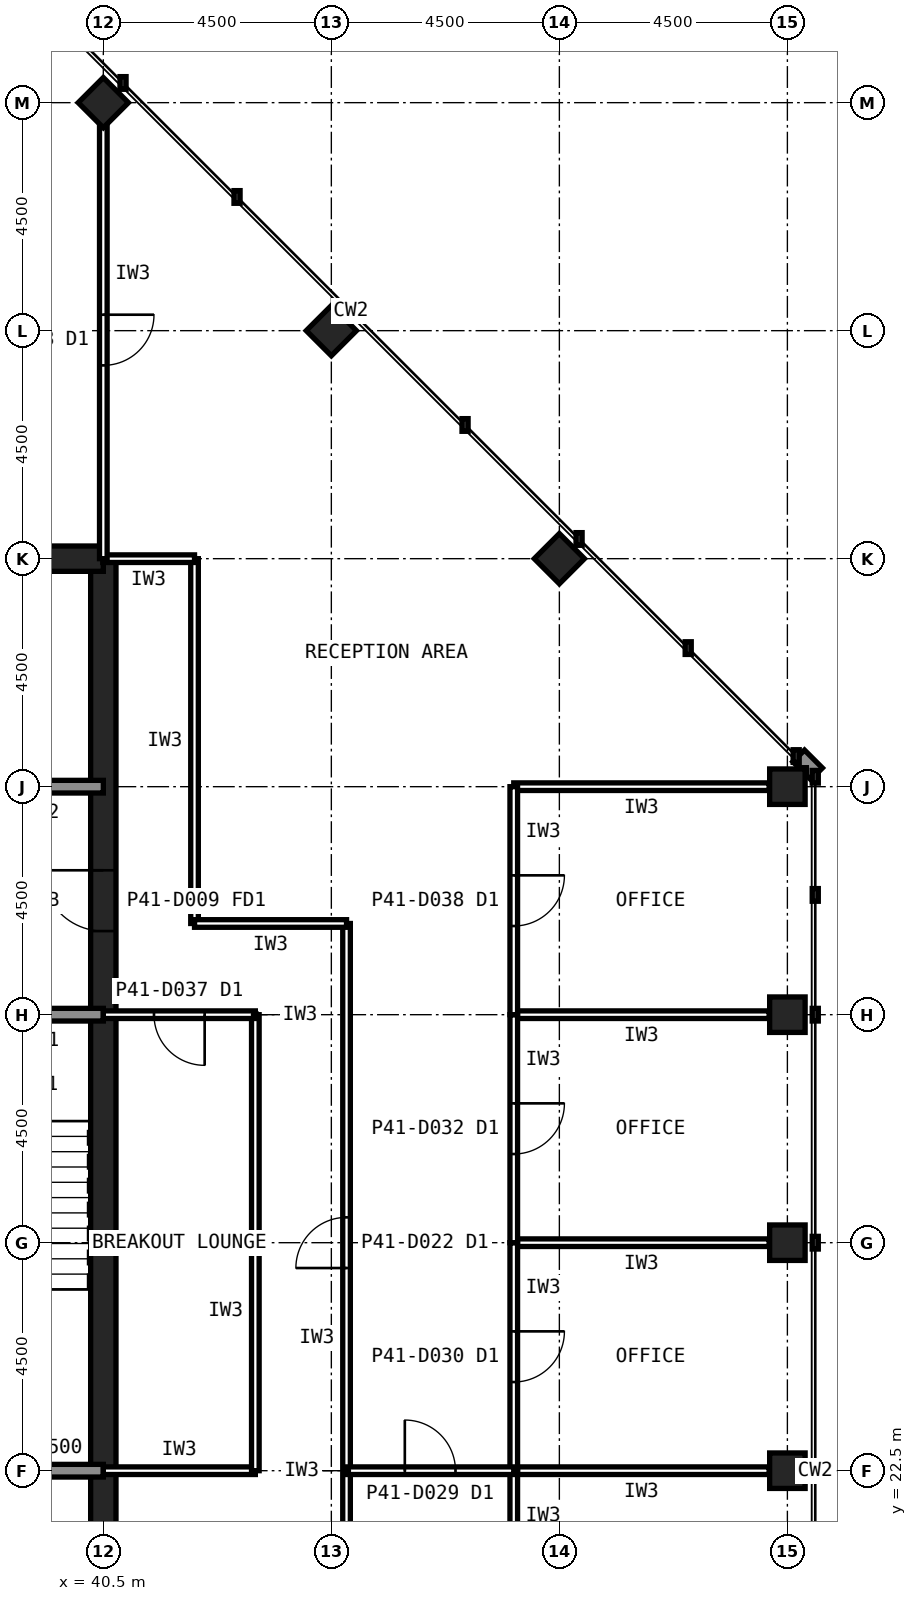
"""IFC4 building model, lengths in metres.
Left out: names, types, materials, properties, quantities, classifications, styles, units other than length and angle.
Written with IfcOpenShell. Run it as: python <this file> out.ifc"""

import sys

from ifc_helpers import new_model, si_unit, direction, frame, frame_2d, origin, origin_2d, place, context, subcontext, project, spatial, rectangle, hollow_rectangle, extrude, element, fill, save


model = new_model("IFC4")
c1 = context("Model", 3, precision=1e-05, world=origin(), true_north=direction((0.0, 1.0)))
c2 = subcontext(c1, "Body", "Model", "MODEL_VIEW")
j1 = project(units=[si_unit("LENGTHUNIT", "METRE"), si_unit("PLANEANGLEUNIT", "RADIAN")], contexts=[c1])
p1 = place(None, origin())
s1 = spatial("IfcSite", under=j1, at=p1, CompositionType="ELEMENT")
p2 = place(p1, origin())
s2 = spatial("IfcBuilding", under=s1, at=p2, CompositionType="ELEMENT")
p3 = place(p2, frame((0.0, 0.0, 175.6)))
s3 = spatial("IfcBuildingStorey", under=s2, at=p3, CompositionType="ELEMENT", Elevation=175.6)
for number, where, z_axis, x_axis in (
    (1, (54.0, 22.5, 0.0), (0.0, 0.0, 1.0), (1.0, 0.0, 0.0)),
    (2, (54.0, 27.0, 0.0), (0.0, 0.0, 1.0), (1.0, 0.0, 0.0)),
    (3, (54.0, 31.5, 0.0), (0.0, 0.0, 1.0), (1.0, 0.0, 0.0)),
    (4, (54.0, 36.0, 0.0), (0.0, 0.0, 1.0), (1.0, 0.0, 0.0)),
    (5, (49.5, 40.5, 0.0), (0.0, 0.0, 1.0), (0.707, 0.707, 0.0)),
    (6, (45.0, 45.0, 0.0), (0.0, 0.0, 1.0), (0.707, 0.707, 0.0)),
    (7, (40.5, 49.5, 0.0), (0.0, 0.0, 1.0), (0.707, 0.707, 0.0)),
):
    element("IfcColumn", number, at=place(p3, frame(where, z_axis=z_axis, x_axis=x_axis)), inside=s3, PredefinedType="COLUMN", context=c2, shape_type="SweptSolid", body=[
        extrude(hollow_rectangle(XDim=0.7, YDim=0.7, WallThickness=0.036, at=origin_2d()), origin(), (0.0, 0.0, 1.0), 4.0),
    ])
p4 = place(p3, frame((40.5, 13.5, 0.0), z_axis=(0.0, 0.0, 1.0), x_axis=(0.0, 1.0, 0.0)))
e8 = element("IfcWall", 8, at=p4, inside=s3, PredefinedType="SHEAR", context=c2, shape_type="SweptSolid", body=[
    extrude(rectangle(XDim=27.0, YDim=0.5, at=frame_2d((13.5, 0.0))), origin(), (0.0, 0.0, 1.0), 4.0),
])
p5 = place(p4, frame((5.85, 0.0, 0.0)))
e9 = element("IfcOpeningElement", 9, at=p5, cuts=e8, PredefinedType="OPENING", context=c2, shape_type="SweptSolid", body=[
    extrude(rectangle(XDim=1.8, YDim=2.1, at=frame_2d((0.9, 1.05))), frame((0.0, 0.26, 0.0), z_axis=(0.0, -1.0, 0.0), x_axis=(1.0, 0.0, 0.0)), (0.0, 0.0, 1.0), 0.52),
])
p6 = place(p4, frame((19.65, 0.0, 0.0)))
e10 = element("IfcOpeningElement", 10, at=p6, cuts=e8, PredefinedType="OPENING", context=c2, shape_type="SweptSolid", body=[
    extrude(rectangle(XDim=1.2, YDim=2.1, at=frame_2d((0.6, 1.05))), frame((0.0, 0.26, 0.0), z_axis=(0.0, -1.0, 0.0), x_axis=(1.0, 0.0, 0.0)), (0.0, 0.0, 1.0), 0.52),
])
p7 = place(p3, frame((40.5, 40.5, 0.0), z_axis=(0.0, 0.0, 1.0), x_axis=(-1.0, 0.0, 0.0)))
e11 = element("IfcWall", 11, at=p7, inside=s3, PredefinedType="SHEAR", context=c2, shape_type="SweptSolid", body=[
    extrude(rectangle(XDim=27.0, YDim=0.5, at=frame_2d((13.5, 0.0))), origin(), (0.0, 0.0, 1.0), 4.0),
])
p8 = place(p3, frame((13.5, 36.0, 0.0), z_axis=(0.0, 0.0, 1.0), x_axis=(1.0, 0.0, 0.0)))
e12 = element("IfcWall", 12, at=p8, inside=s3, PredefinedType="SOLIDWALL", context=c2, shape_type="SweptSolid", body=[
    extrude(rectangle(XDim=27.0, YDim=0.25, at=frame_2d((13.5, 0.0))), origin(), (0.0, 0.0, 1.0), 3.84),
])
p9 = place(p8, frame((1.8, 0.0, 0.0)))
e13 = element("IfcOpeningElement", 13, at=p9, cuts=e12, PredefinedType="OPENING", context=c2, shape_type="SweptSolid", body=[
    extrude(rectangle(XDim=0.9, YDim=2.1, at=frame_2d((0.45, 1.05))), frame((0.0, 0.135, 0.0), z_axis=(0.0, -1.0, 0.0), x_axis=(1.0, 0.0, 0.0)), (0.0, 0.0, 1.0), 0.27),
])
p10 = place(p8, frame((5.55, 0.0, 0.0)))
e14 = element("IfcOpeningElement", 14, at=p10, cuts=e12, PredefinedType="OPENING", context=c2, shape_type="SweptSolid", body=[
    extrude(rectangle(XDim=0.9, YDim=2.1, at=frame_2d((0.45, 1.05))), frame((0.0, 0.135, 0.0), z_axis=(0.0, -1.0, 0.0), x_axis=(1.0, 0.0, 0.0)), (0.0, 0.0, 1.0), 0.27),
])
p11 = place(p8, frame((8.55, 0.0, 0.0)))
e15 = element("IfcOpeningElement", 15, at=p11, cuts=e12, PredefinedType="OPENING", context=c2, shape_type="SweptSolid", body=[
    extrude(rectangle(XDim=0.9, YDim=2.1, at=frame_2d((0.45, 1.05))), frame((0.0, 0.135, 0.0), z_axis=(0.0, -1.0, 0.0), x_axis=(1.0, 0.0, 0.0)), (0.0, 0.0, 1.0), 0.27),
])
p12 = place(p8, frame((11.55, 0.0, 0.0)))
e16 = element("IfcOpeningElement", 16, at=p12, cuts=e12, PredefinedType="OPENING", context=c2, shape_type="SweptSolid", body=[
    extrude(rectangle(XDim=0.9, YDim=2.1, at=frame_2d((0.45, 1.05))), frame((0.0, 0.135, 0.0), z_axis=(0.0, -1.0, 0.0), x_axis=(1.0, 0.0, 0.0)), (0.0, 0.0, 1.0), 0.27),
])
p13 = place(p8, frame((24.1, 0.0, 0.0)))
e17 = element("IfcOpeningElement", 17, at=p13, cuts=e12, PredefinedType="OPENING", context=c2, shape_type="SweptSolid", body=[
    extrude(rectangle(XDim=1.3, YDim=2.2, at=frame_2d((0.65, 1.1))), frame((0.0, 0.135, 0.0), z_axis=(0.0, -1.0, 0.0), x_axis=(1.0, 0.0, 0.0)), (0.0, 0.0, 1.0), 0.27),
])
p14 = place(p3, frame((13.5, 22.5, 0.0), z_axis=(0.0, 0.0, 1.0), x_axis=(1.0, 0.0, 0.0)))
e18 = element("IfcWall", 18, at=p14, inside=s3, PredefinedType="SOLIDWALL", context=c2, shape_type="SweptSolid", body=[
    extrude(rectangle(XDim=27.0, YDim=0.25, at=frame_2d((13.5, 0.0))), origin(), (0.0, 0.0, 1.0), 3.84),
])
p15 = place(p14, frame((1.65, 0.0, 0.0)))
e19 = element("IfcOpeningElement", 19, at=p15, cuts=e18, PredefinedType="OPENING", context=c2, shape_type="SweptSolid", body=[
    extrude(rectangle(XDim=1.2, YDim=2.1, at=frame_2d((0.6, 1.05))), frame((0.0, 0.135, 0.0), z_axis=(0.0, -1.0, 0.0), x_axis=(1.0, 0.0, 0.0)), (0.0, 0.0, 1.0), 0.27),
])
p16 = place(p14, frame((6.025, 0.0, 0.0)))
e20 = element("IfcOpeningElement", 20, at=p16, cuts=e18, PredefinedType="OPENING", context=c2, shape_type="SweptSolid", body=[
    extrude(rectangle(XDim=1.0, YDim=2.1, at=frame_2d((0.5, 1.05))), frame((0.0, 0.135, 0.0), z_axis=(0.0, -1.0, 0.0), x_axis=(1.0, 0.0, 0.0)), (0.0, 0.0, 1.0), 0.27),
])
p17 = place(p14, frame((10.525, 0.0, 0.0)))
e21 = element("IfcOpeningElement", 21, at=p17, cuts=e18, PredefinedType="OPENING", context=c2, shape_type="SweptSolid", body=[
    extrude(rectangle(XDim=1.0, YDim=2.1, at=frame_2d((0.5, 1.05))), frame((0.0, 0.135, 0.0), z_axis=(0.0, -1.0, 0.0), x_axis=(1.0, 0.0, 0.0)), (0.0, 0.0, 1.0), 0.27),
])
p18 = place(p14, frame((19.75, 0.0, 0.0)))
e22 = element("IfcOpeningElement", 22, at=p18, cuts=e18, PredefinedType="OPENING", context=c2, shape_type="SweptSolid", body=[
    extrude(rectangle(XDim=1.0, YDim=2.1, at=frame_2d((0.5, 1.05))), frame((0.0, 0.135, 0.0), z_axis=(0.0, -1.0, 0.0), x_axis=(1.0, 0.0, 0.0)), (0.0, 0.0, 1.0), 0.27),
])
p19 = place(p14, frame((15.05, 0.0, 0.0)))
e23 = element("IfcOpeningElement", 23, at=p19, cuts=e18, PredefinedType="OPENING", context=c2, shape_type="SweptSolid", body=[
    extrude(rectangle(XDim=1.4, YDim=2.4, at=frame_2d((0.7, 1.2))), frame((0.0, 0.135, 0.0), z_axis=(0.0, -1.0, 0.0), x_axis=(1.0, 0.0, 0.0)), (0.0, 0.0, 1.0), 0.27),
])
p20 = place(p3, frame((13.5, 31.5, 0.0), z_axis=(0.0, 0.0, 1.0), x_axis=(1.0, 0.0, 0.0)))
e24 = element("IfcWall", 24, at=p20, inside=s3, PredefinedType="SOLIDWALL", context=c2, shape_type="SweptSolid", body=[
    extrude(rectangle(XDim=27.0, YDim=0.25, at=frame_2d((13.5, 0.0))), origin(), (0.0, 0.0, 1.0), 3.84),
])
p21 = place(p20, frame((24.15, 0.0, 0.0)))
e25 = element("IfcOpeningElement", 25, at=p21, cuts=e24, PredefinedType="OPENING", context=c2, shape_type="SweptSolid", body=[
    extrude(rectangle(XDim=1.2, YDim=2.1, at=frame_2d((0.6, 1.05))), frame((0.0, 0.135, 0.0), z_axis=(0.0, -1.0, 0.0), x_axis=(1.0, 0.0, 0.0)), (0.0, 0.0, 1.0), 0.27),
])
p22 = place(p20, frame((15.3, 0.0, 0.0)))
e26 = element("IfcOpeningElement", 26, at=p22, cuts=e24, PredefinedType="OPENING", context=c2, shape_type="SweptSolid", body=[
    extrude(rectangle(XDim=0.9, YDim=2.1, at=frame_2d((0.45, 1.05))), frame((0.0, 0.135, 0.0), z_axis=(0.0, -1.0, 0.0), x_axis=(1.0, 0.0, 0.0)), (0.0, 0.0, 1.0), 0.27),
])
p23 = place(p20, frame((19.8, 0.0, 0.0)))
e27 = element("IfcOpeningElement", 27, at=p23, cuts=e24, PredefinedType="OPENING", context=c2, shape_type="SweptSolid", body=[
    extrude(rectangle(XDim=0.9, YDim=2.1, at=frame_2d((0.45, 1.05))), frame((0.0, 0.135, 0.0), z_axis=(0.0, -1.0, 0.0), x_axis=(1.0, 0.0, 0.0)), (0.0, 0.0, 1.0), 0.27),
])
p24 = place(p3, frame((45.3, 20.7, 0.0), z_axis=(0.0, 0.0, 1.0), x_axis=(0.0, 1.0, 0.0)))
e28 = element("IfcWall", 28, at=p24, inside=s3, PredefinedType="PARTITIONING", context=c2, shape_type="SweptSolid", body=[
    extrude(rectangle(XDim=12.6, YDim=0.15, at=frame_2d((6.3, 0.0))), origin(), (0.0, 0.0, 1.0), 3.84),
])
p25 = place(p24, frame((5.8, 0.0, 0.0)))
e29 = element("IfcOpeningElement", 29, at=p25, cuts=e28, PredefinedType="OPENING", context=c2, shape_type="SweptSolid", body=[
    extrude(rectangle(XDim=1.0, YDim=2.1, at=frame_2d((0.5, 1.05))), frame((0.0, 0.085, 0.0), z_axis=(0.0, -1.0, 0.0), x_axis=(1.0, 0.0, 0.0)), (0.0, 0.0, 1.0), 0.17),
])
p26 = place(p3, frame((42.3, 33.3, 0.0), z_axis=(0.0, 0.0, 1.0), x_axis=(0.0, 1.0, 0.0)))
e30 = element("IfcWall", 30, at=p26, inside=s3, PredefinedType="PARTITIONING", context=c2, shape_type="SweptSolid", body=[
    extrude(rectangle(XDim=7.2, YDim=0.15, at=frame_2d((3.6, 0.0))), origin(), (0.0, 0.0, 1.0), 3.84),
])
p27 = place(p3, frame((45.3, 33.3, 0.0), z_axis=(0.0, 0.0, 1.0), x_axis=(-1.0, 0.0, 0.0)))
e31 = element("IfcWall", 31, at=p27, inside=s3, PredefinedType="PARTITIONING", context=c2, shape_type="SweptSolid", body=[
    extrude(rectangle(XDim=3.0, YDim=0.15, at=frame_2d((1.5, 0.0))), origin(), (0.0, 0.0, 1.0), 3.84),
])
p28 = place(p3, frame((42.3, 40.5, 0.0), z_axis=(0.0, 0.0, 1.0), x_axis=(-1.0, 0.0, 0.0)))
e32 = element("IfcWall", 32, at=p28, inside=s3, PredefinedType="PARTITIONING", context=c2, shape_type="SweptSolid", body=[
    extrude(rectangle(XDim=1.81, YDim=0.15, at=frame_2d((0.905, 0.0))), origin(), (0.0, 0.0, 1.0), 2.989),
])
p29 = place(p3, frame((53.64, 22.5, 0.0), z_axis=(0.0, 0.0, 1.0), x_axis=(-1.0, 0.0, 0.0)))
e33 = element("IfcWall", 33, at=p29, inside=s3, PredefinedType="PARTITIONING", context=c2, shape_type="SweptSolid", body=[
    extrude(rectangle(XDim=5.04, YDim=0.15, at=frame_2d((2.52, 0.0))), origin(), (0.0, 0.0, 1.0), 2.989),
])
p30 = place(p3, frame((48.6, 22.5, 0.0), z_axis=(0.0, 0.0, 1.0), x_axis=(0.0, -1.0, 0.0)))
e34 = element("IfcWall", 34, at=p30, inside=s3, PredefinedType="PARTITIONING", context=c2, shape_type="SweptSolid", body=[
    extrude(rectangle(XDim=4.5, YDim=0.15, at=frame_2d((2.25, 0.0))), origin(), (0.0, 0.0, 1.0), 3.84),
])
p31 = place(p30, frame((1.75, 0.0, 0.0)))
e35 = element("IfcOpeningElement", 35, at=p31, cuts=e34, PredefinedType="OPENING", context=c2, shape_type="SweptSolid", body=[
    extrude(rectangle(XDim=1.0, YDim=2.1, at=frame_2d((0.5, 1.05))), frame((0.0, 0.085, 0.0), z_axis=(0.0, -1.0, 0.0), x_axis=(1.0, 0.0, 0.0)), (0.0, 0.0, 1.0), 0.17),
])
p32 = place(p3, frame((53.64, 27.0, 0.0), z_axis=(0.0, 0.0, 1.0), x_axis=(-1.0, 0.0, 0.0)))
e36 = element("IfcWall", 36, at=p32, inside=s3, PredefinedType="PARTITIONING", context=c2, shape_type="SweptSolid", body=[
    extrude(rectangle(XDim=5.04, YDim=0.15, at=frame_2d((2.52, 0.0))), origin(), (0.0, 0.0, 1.0), 2.989),
])
p33 = place(p3, frame((48.6, 27.0, 0.0), z_axis=(0.0, 0.0, 1.0), x_axis=(0.0, -1.0, 0.0)))
e37 = element("IfcWall", 37, at=p33, inside=s3, PredefinedType="PARTITIONING", context=c2, shape_type="SweptSolid", body=[
    extrude(rectangle(XDim=4.5, YDim=0.15, at=frame_2d((2.25, 0.0))), origin(), (0.0, 0.0, 1.0), 3.84),
])
p34 = place(p33, frame((1.75, 0.0, 0.0)))
e38 = element("IfcOpeningElement", 38, at=p34, cuts=e37, PredefinedType="OPENING", context=c2, shape_type="SweptSolid", body=[
    extrude(rectangle(XDim=1.0, YDim=2.1, at=frame_2d((0.5, 1.05))), frame((0.0, 0.085, 0.0), z_axis=(0.0, -1.0, 0.0), x_axis=(1.0, 0.0, 0.0)), (0.0, 0.0, 1.0), 0.17),
])
p35 = place(p3, frame((53.64, 31.5, 0.0), z_axis=(0.0, 0.0, 1.0), x_axis=(-1.0, 0.0, 0.0)))
e39 = element("IfcWall", 39, at=p35, inside=s3, PredefinedType="PARTITIONING", context=c2, shape_type="SweptSolid", body=[
    extrude(rectangle(XDim=5.04, YDim=0.15, at=frame_2d((2.52, 0.0))), origin(), (0.0, 0.0, 1.0), 2.989),
])
p36 = place(p3, frame((48.6, 31.5, 0.0), z_axis=(0.0, 0.0, 1.0), x_axis=(0.0, -1.0, 0.0)))
e40 = element("IfcWall", 40, at=p36, inside=s3, PredefinedType="PARTITIONING", context=c2, shape_type="SweptSolid", body=[
    extrude(rectangle(XDim=4.5, YDim=0.15, at=frame_2d((2.25, 0.0))), origin(), (0.0, 0.0, 1.0), 3.84),
])
p37 = place(p36, frame((1.75, 0.0, 0.0)))
e41 = element("IfcOpeningElement", 41, at=p37, cuts=e40, PredefinedType="OPENING", context=c2, shape_type="SweptSolid", body=[
    extrude(rectangle(XDim=1.0, YDim=2.1, at=frame_2d((0.5, 1.05))), frame((0.0, 0.085, 0.0), z_axis=(0.0, -1.0, 0.0), x_axis=(1.0, 0.0, 0.0)), (0.0, 0.0, 1.0), 0.17),
])
p38 = place(p3, frame((53.64, 36.0, 0.0), z_axis=(0.0, 0.0, 1.0), x_axis=(-1.0, 0.0, 0.0)))
e42 = element("IfcWall", 42, at=p38, inside=s3, PredefinedType="PARTITIONING", context=c2, shape_type="SweptSolid", body=[
    extrude(rectangle(XDim=5.04, YDim=0.15, at=frame_2d((2.52, 0.0))), origin(), (0.0, 0.0, 1.0), 2.989),
])
p39 = place(p3, frame((48.6, 36.0, 0.0), z_axis=(0.0, 0.0, 1.0), x_axis=(0.0, -1.0, 0.0)))
e43 = element("IfcWall", 43, at=p39, inside=s3, PredefinedType="PARTITIONING", context=c2, shape_type="SweptSolid", body=[
    extrude(rectangle(XDim=4.5, YDim=0.15, at=frame_2d((2.25, 0.0))), origin(), (0.0, 0.0, 1.0), 3.84),
])
p40 = place(p39, frame((1.75, 0.0, 0.0)))
e44 = element("IfcOpeningElement", 44, at=p40, cuts=e43, PredefinedType="OPENING", context=c2, shape_type="SweptSolid", body=[
    extrude(rectangle(XDim=1.0, YDim=2.1, at=frame_2d((0.5, 1.05))), frame((0.0, 0.085, 0.0), z_axis=(0.0, -1.0, 0.0), x_axis=(1.0, 0.0, 0.0)), (0.0, 0.0, 1.0), 0.17),
])
p41 = place(p3, frame((40.5, 22.5, 0.0), z_axis=(0.0, 0.0, 1.0), x_axis=(1.0, 0.0, 0.0)))
e45 = element("IfcWall", 45, at=p41, inside=s3, PredefinedType="PARTITIONING", context=c2, shape_type="SweptSolid", body=[
    extrude(rectangle(XDim=3.0, YDim=0.15, at=frame_2d((1.5, 0.0))), origin(), (0.0, 0.0, 1.0), 2.989),
])
p42 = place(p3, frame((43.5, 22.5, 0.0), z_axis=(0.0, 0.0, 1.0), x_axis=(0.0, 1.0, 0.0)))
e46 = element("IfcWall", 46, at=p42, inside=s3, PredefinedType="PARTITIONING", context=c2, shape_type="SweptSolid", body=[
    extrude(rectangle(XDim=9.0, YDim=0.15, at=frame_2d((4.5, 0.0))), origin(), (0.0, 0.0, 1.0), 3.84),
])
p43 = place(p3, frame((43.5, 31.5, 0.0), z_axis=(0.0, 0.0, 1.0), x_axis=(-1.0, 0.0, 0.0)))
e47 = element("IfcWall", 47, at=p43, inside=s3, PredefinedType="PARTITIONING", context=c2, shape_type="SweptSolid", body=[
    extrude(rectangle(XDim=3.0, YDim=0.15, at=frame_2d((1.5, 0.0))), origin(), (0.0, 0.0, 1.0), 2.989),
])
p44 = place(p43, frame((1.0, 0.0, 0.0)))
e48 = element("IfcOpeningElement", 48, at=p44, cuts=e47, PredefinedType="OPENING", context=c2, shape_type="SweptSolid", body=[
    extrude(rectangle(XDim=1.0, YDim=2.1, at=frame_2d((0.5, 1.05))), frame((0.0, 0.085, 0.0), z_axis=(0.0, -1.0, 0.0), x_axis=(1.0, 0.0, 0.0)), (0.0, 0.0, 1.0), 0.17),
])
p45 = place(p3, frame((40.5, 49.13, 0.0), z_axis=(0.0, 0.0, 1.0), x_axis=(0.0, -1.0, 0.0)))
e49 = element("IfcWall", 49, at=p45, inside=s3, PredefinedType="PARTITIONING", context=c2, shape_type="SweptSolid", body=[
    extrude(rectangle(XDim=8.63, YDim=0.15, at=frame_2d((4.315, 0.0))), origin(), (0.0, 0.0, 1.0), 2.989),
])
p46 = place(p45, frame((3.815, 0.0, 0.0)))
e50 = element("IfcOpeningElement", 50, at=p46, cuts=e49, PredefinedType="OPENING", context=c2, shape_type="SweptSolid", body=[
    extrude(rectangle(XDim=1.0, YDim=2.1, at=frame_2d((0.5, 1.05))), frame((0.0, 0.085, 0.0), z_axis=(0.0, -1.0, 0.0), x_axis=(1.0, 0.0, 0.0)), (0.0, 0.0, 1.0), 0.17),
])
p47 = place(p3, frame((45.3, 22.5, 0.0), z_axis=(0.0, 0.0, 1.0), x_axis=(1.0, 0.0, 0.0)))
e51 = element("IfcWall", 51, at=p47, inside=s3, PredefinedType="PARTITIONING", context=c2, shape_type="SweptSolid", body=[
    extrude(rectangle(XDim=3.3, YDim=0.15, at=frame_2d((1.65, 0.0))), origin(), (0.0, 0.0, 1.0), 2.989),
])
p48 = place(p47, frame((1.15, 0.0, 0.0)))
e52 = element("IfcOpeningElement", 52, at=p48, cuts=e51, PredefinedType="OPENING", context=c2, shape_type="SweptSolid", body=[
    extrude(rectangle(XDim=1.0, YDim=2.1, at=frame_2d((0.5, 1.05))), frame((0.0, 0.085, 0.0), z_axis=(0.0, -1.0, 0.0), x_axis=(1.0, 0.0, 0.0)), (0.0, 0.0, 1.0), 0.17),
])
p49 = place(p6, origin())
e53 = element("IfcDoor", 53, at=p49, inside=s3, OperationType="SINGLE_SWING_RIGHT", PredefinedType="DOOR", context=c2, shape_type="SweptSolid", body=[
    extrude(rectangle(XDim=1.2, YDim=2.1, at=frame_2d((0.6, 1.05))), frame((0.0, 0.025, 0.0), z_axis=(0.0, -1.0, 0.0), x_axis=(1.0, 0.0, 0.0)), (0.0, 0.0, 1.0), 0.05),
])
fill(e10, e53)
p50 = place(p25, origin())
e54 = element("IfcDoor", 54, at=p50, inside=s3, OperationType="SINGLE_SWING_LEFT", PredefinedType="DOOR", context=c2, shape_type="SweptSolid", body=[
    extrude(rectangle(XDim=1.0, YDim=2.1, at=frame_2d((0.5, 1.05))), frame((0.0, 0.025, 0.0), z_axis=(0.0, -1.0, 0.0), x_axis=(1.0, 0.0, 0.0)), (0.0, 0.0, 1.0), 0.05),
])
fill(e29, e54)
p51 = place(p34, origin())
e55 = element("IfcDoor", 55, at=p51, inside=s3, OperationType="SINGLE_SWING_LEFT", PredefinedType="DOOR", context=c2, shape_type="SweptSolid", body=[
    extrude(rectangle(XDim=1.0, YDim=2.1, at=frame_2d((0.5, 1.05))), frame((0.0, 0.025, 0.0), z_axis=(0.0, -1.0, 0.0), x_axis=(1.0, 0.0, 0.0)), (0.0, 0.0, 1.0), 0.05),
])
fill(e38, e55)
p52 = place(p37, origin())
e56 = element("IfcDoor", 56, at=p52, inside=s3, OperationType="SINGLE_SWING_LEFT", PredefinedType="DOOR", context=c2, shape_type="SweptSolid", body=[
    extrude(rectangle(XDim=1.0, YDim=2.1, at=frame_2d((0.5, 1.05))), frame((0.0, 0.025, 0.0), z_axis=(0.0, -1.0, 0.0), x_axis=(1.0, 0.0, 0.0)), (0.0, 0.0, 1.0), 0.05),
])
fill(e41, e56)
p53 = place(p40, origin())
e57 = element("IfcDoor", 57, at=p53, inside=s3, OperationType="SINGLE_SWING_LEFT", PredefinedType="DOOR", context=c2, shape_type="SweptSolid", body=[
    extrude(rectangle(XDim=1.0, YDim=2.1, at=frame_2d((0.5, 1.05))), frame((0.0, 0.025, 0.0), z_axis=(0.0, -1.0, 0.0), x_axis=(1.0, 0.0, 0.0)), (0.0, 0.0, 1.0), 0.05),
])
fill(e44, e57)
p54 = place(p44, origin())
e58 = element("IfcDoor", 58, at=p54, inside=s3, OperationType="SINGLE_SWING_LEFT", PredefinedType="DOOR", context=c2, shape_type="SweptSolid", body=[
    extrude(rectangle(XDim=1.0, YDim=2.1, at=frame_2d((0.5, 1.05))), frame((0.0, 0.025, 0.0), z_axis=(0.0, -1.0, 0.0), x_axis=(1.0, 0.0, 0.0)), (0.0, 0.0, 1.0), 0.05),
])
fill(e48, e58)
p55 = place(p46, origin())
e59 = element("IfcDoor", 59, at=p55, inside=s3, OperationType="SINGLE_SWING_LEFT", PredefinedType="DOOR", context=c2, shape_type="SweptSolid", body=[
    extrude(rectangle(XDim=1.0, YDim=2.1, at=frame_2d((0.5, 1.05))), frame((0.0, 0.025, 0.0), z_axis=(0.0, -1.0, 0.0), x_axis=(1.0, 0.0, 0.0)), (0.0, 0.0, 1.0), 0.05),
])
fill(e50, e59)
p56 = place(p48, origin())
e60 = element("IfcDoor", 60, at=p56, inside=s3, OperationType="SINGLE_SWING_LEFT", PredefinedType="DOOR", context=c2, shape_type="SweptSolid", body=[
    extrude(rectangle(XDim=1.0, YDim=2.1, at=frame_2d((0.5, 1.05))), frame((0.0, 0.025, 0.0), z_axis=(0.0, -1.0, 0.0), x_axis=(1.0, 0.0, 0.0)), (0.0, 0.0, 1.0), 0.05),
])
fill(e52, e60)
save(model, sys.argv[1])
